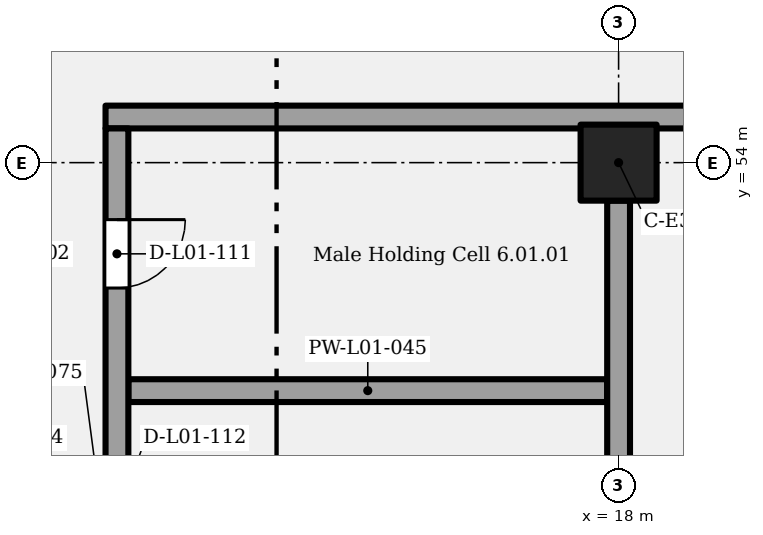
"""IFC4 building model, lengths in metres.
Left out: names, types, materials, properties, quantities, classifications, styles, units other than length and angle.
Written with IfcOpenShell. Run it as: python <this file> out.ifc"""

import sys

from ifc_helpers import new_model, si_unit, direction, frame, frame_2d, origin, origin_2d, place, context, subcontext, project, spatial, rectangle, extrude, element, fill, save


model = new_model("IFC4")
c1 = context("Model", 3, precision=1e-05, world=origin(), true_north=direction((0.0, 1.0)))
c2 = subcontext(c1, "Body", "Model", "MODEL_VIEW")
j1 = project(units=[si_unit("LENGTHUNIT", "METRE"), si_unit("PLANEANGLEUNIT", "RADIAN")], contexts=[c1])
p1 = place(None, origin())
s1 = spatial("IfcSite", under=j1, at=p1, CompositionType="ELEMENT")
p2 = place(p1, origin())
s2 = spatial("IfcBuilding", under=s1, at=p2, CompositionType="ELEMENT")
p3 = place(p2, frame((0.0, 0.0, 6.6)))
s3 = spatial("IfcBuildingStorey", under=s2, at=p3, CompositionType="ELEMENT", Elevation=6.6)
p4 = place(p3, frame((18.0, 54.0, 0.0), z_axis=(0.0, 0.0, 1.0), x_axis=(1.0, 0.0, 0.0)))
e1 = element("IfcColumn", 1, at=p4, inside=s3, PredefinedType="COLUMN", context=c2, shape_type="SweptSolid", body=[
    extrude(rectangle(XDim=1.0, YDim=1.0, at=origin_2d()), origin(), (0.0, 0.0, 1.0), 5.4),
])
p5 = place(p3, frame((11.55, 51.0, 0.0), z_axis=(0.0, 0.0, 1.0), x_axis=(1.0, 0.0, 0.0)))
e2 = element("IfcWall", 2, at=p5, inside=s3, PredefinedType="PARTITIONING", context=c2, shape_type="SweptSolid", body=[
    extrude(rectangle(XDim=6.3, YDim=0.3, at=frame_2d((3.15, 0.0))), origin(), (0.0, 0.0, 1.0), 5.1),
])
p6 = place(p3, frame((11.25, 54.6, 0.0), z_axis=(0.0, 0.0, 1.0), x_axis=(1.0, 0.0, 0.0)))
e3 = element("IfcWall", 3, at=p6, inside=s3, PredefinedType="PARTITIONING", context=c2, shape_type="SweptSolid", body=[
    extrude(rectangle(XDim=15.75, YDim=0.3, at=frame_2d((7.875, 0.0))), origin(), (0.0, 0.0, 1.0), 5.1),
])
p7 = place(p6, frame((15.15, 0.0, 0.0), z_axis=(0.0, 0.0, 1.0), x_axis=(-1.0, 0.0, 0.0)))
e4 = element("IfcOpeningElement", 4, at=p7, cuts=e3, PredefinedType="OPENING", context=c2, shape_type="SweptSolid", body=[
    extrude(rectangle(XDim=1.2, YDim=2.1, at=frame_2d((0.6, 1.05))), frame((0.0, 0.16, 0.0), z_axis=(0.0, -1.0, 0.0), x_axis=(1.0, 0.0, 0.0)), (0.0, 0.0, 1.0), 0.32),
])
p8 = place(p6, frame((10.25, 0.0, 0.0), z_axis=(0.0, 0.0, 1.0), x_axis=(-1.0, 0.0, 0.0)))
e5 = element("IfcOpeningElement", 5, at=p8, cuts=e3, PredefinedType="OPENING", context=c2, shape_type="SweptSolid", body=[
    extrude(rectangle(XDim=1.0, YDim=2.1, at=frame_2d((0.5, 1.05))), frame((0.0, 0.16, 0.0), z_axis=(0.0, -1.0, 0.0), x_axis=(1.0, 0.0, 0.0)), (0.0, 0.0, 1.0), 0.32),
])
p9 = place(p3, frame((11.4, 41.25, 0.0), z_axis=(0.0, 0.0, 1.0), x_axis=(0.0, 1.0, 0.0)))
e6 = element("IfcWall", 6, at=p9, inside=s3, PredefinedType="PARTITIONING", context=c2, shape_type="SweptSolid", body=[
    extrude(rectangle(XDim=13.2, YDim=0.3, at=frame_2d((6.6, 0.0))), origin(), (0.0, 0.0, 1.0), 5.1),
])
p10 = place(p9, frame((12.0, 0.0, 0.0), z_axis=(0.0, 0.0, 1.0), x_axis=(-1.0, 0.0, 0.0)))
e7 = element("IfcOpeningElement", 7, at=p10, cuts=e6, PredefinedType="OPENING", context=c2, shape_type="SweptSolid", body=[
    extrude(rectangle(XDim=0.9, YDim=2.0, at=frame_2d((0.45, 1.0))), frame((0.0, 0.16, 0.0), z_axis=(0.0, -1.0, 0.0), x_axis=(1.0, 0.0, 0.0)), (0.0, 0.0, 1.0), 0.32),
])
p11 = place(p9, frame((8.55, 0.0, 0.0), z_axis=(0.0, 0.0, 1.0), x_axis=(-1.0, 0.0, 0.0)))
e8 = element("IfcOpeningElement", 8, at=p11, cuts=e6, PredefinedType="OPENING", context=c2, shape_type="SweptSolid", body=[
    extrude(rectangle(XDim=0.9, YDim=2.0, at=frame_2d((0.45, 1.0))), frame((0.0, 0.16, 0.0), z_axis=(0.0, -1.0, 0.0), x_axis=(1.0, 0.0, 0.0)), (0.0, 0.0, 1.0), 0.32),
])
p12 = place(p9, frame((5.25, 0.0, 0.0), z_axis=(0.0, 0.0, 1.0), x_axis=(-1.0, 0.0, 0.0)))
e9 = element("IfcOpeningElement", 9, at=p12, cuts=e6, PredefinedType="OPENING", context=c2, shape_type="SweptSolid", body=[
    extrude(rectangle(XDim=0.9, YDim=2.0, at=frame_2d((0.45, 1.0))), frame((0.0, 0.16, 0.0), z_axis=(0.0, -1.0, 0.0), x_axis=(1.0, 0.0, 0.0)), (0.0, 0.0, 1.0), 0.32),
])
p13 = place(p9, frame((1.95, 0.0, 0.0), z_axis=(0.0, 0.0, 1.0), x_axis=(-1.0, 0.0, 0.0)))
e10 = element("IfcOpeningElement", 10, at=p13, cuts=e6, PredefinedType="OPENING", context=c2, shape_type="SweptSolid", body=[
    extrude(rectangle(XDim=0.9, YDim=2.0, at=frame_2d((0.45, 1.0))), frame((0.0, 0.16, 0.0), z_axis=(0.0, -1.0, 0.0), x_axis=(1.0, 0.0, 0.0)), (0.0, 0.0, 1.0), 0.32),
])
p14 = place(p3, frame((18.0, 38.0, 0.0), z_axis=(0.0, 0.0, 1.0), x_axis=(0.0, 1.0, 0.0)))
e11 = element("IfcWall", 11, at=p14, inside=s3, PredefinedType="PARTITIONING", context=c2, shape_type="SweptSolid", body=[
    extrude(rectangle(XDim=15.5, YDim=0.3, at=frame_2d((7.75, 0.0))), origin(), (0.0, 0.0, 1.0), 4.15),
])
p15 = place(p10, origin())
e12 = element("IfcDoor", 12, at=p15, inside=s3, OperationType="SINGLE_SWING_LEFT", PredefinedType="DOOR", context=c2, shape_type="SweptSolid", body=[
    extrude(rectangle(XDim=0.9, YDim=2.0, at=frame_2d((0.45, 1.0))), frame((0.0, 0.025, 0.0), z_axis=(0.0, -1.0, 0.0), x_axis=(1.0, 0.0, 0.0)), (0.0, 0.0, 1.0), 0.05),
])
fill(e7, e12)
save(model, sys.argv[1])
